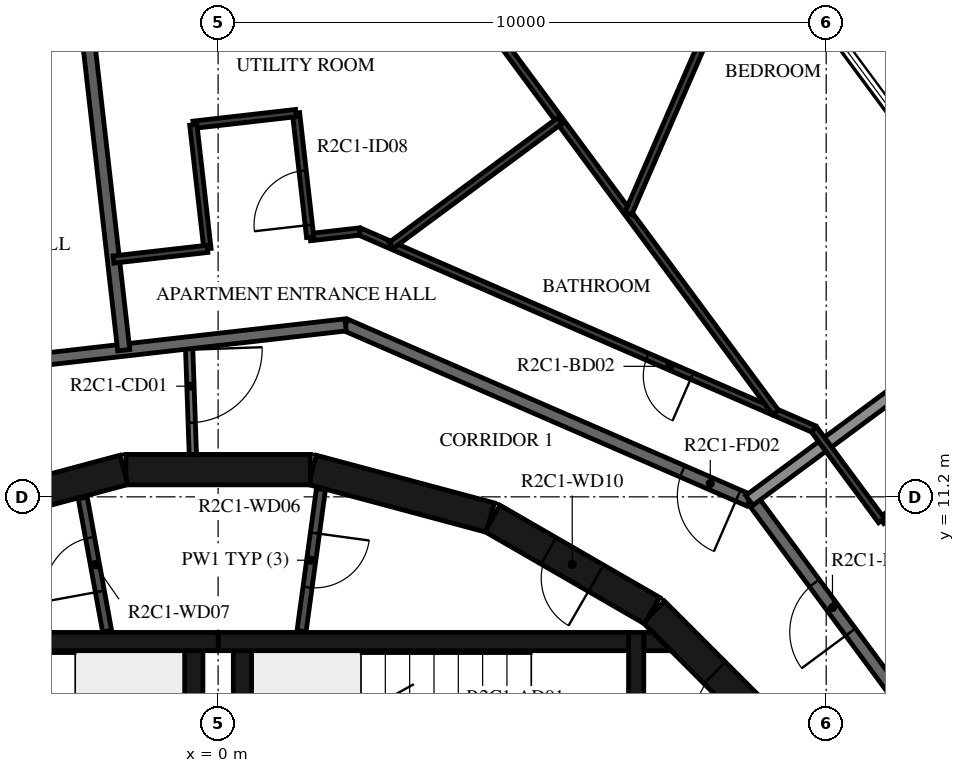
"""IFC4 building model, lengths in metres.
Left out: names, types, materials, properties, quantities, classifications, styles, units other than length and angle.
Written with IfcOpenShell. Run it as: python <this file> out.ifc"""

import sys

from ifc_helpers import new_model, si_unit, direction, frame, frame_2d, origin, place, context, subcontext, project, spatial, polyline, rectangle, outline, extrude, element, fill, save


model = new_model("IFC4")
c1 = context("Model", 3, precision=1e-05, world=origin(), true_north=direction((0.0, 1.0)))
c2 = subcontext(c1, "Body", "Model", "MODEL_VIEW")
j1 = project(units=[si_unit("LENGTHUNIT", "METRE"), si_unit("PLANEANGLEUNIT", "RADIAN")], contexts=[c1])
p1 = place(None, origin())
s1 = spatial("IfcSite", under=j1, at=p1, CompositionType="ELEMENT")
p2 = place(p1, origin())
s2 = spatial("IfcBuilding", under=s1, at=p2, CompositionType="ELEMENT")
p3 = place(p2, frame((0.0, 0.0, 101.2)))
s3 = spatial("IfcBuildingStorey", under=s2, at=p3, CompositionType="ELEMENT", Elevation=101.2)
p4 = place(p3, frame((9.308, 7.164, 0.0), z_axis=(0.0, 0.0, 1.0), x_axis=(-0.707106781187, 0.707106781187, 0.0)))
e1 = element("IfcWall", 1, at=p4, inside=s3, PredefinedType="SHEAR", context=c2, shape_type="SweptSolid", body=[
    extrude(rectangle(XDim=3.032, YDim=0.5, at=frame_2d((1.516, 0.0))), origin(), (0.0, 0.0, 1.0), 3.12),
])
p5 = place(p4, frame((0.416, 0.0, 0.0)))
e2 = element("IfcOpeningElement", 2, at=p5, cuts=e1, PredefinedType="OPENING", context=c2, shape_type="SweptSolid", body=[
    extrude(rectangle(XDim=1.2, YDim=2.1, at=frame_2d((0.6, 1.05))), frame((0.0, 0.26, 0.0), z_axis=(0.0, -1.0, 0.0), x_axis=(1.0, 0.0, 0.0)), (0.0, 0.0, 1.0), 0.52),
])
p6 = place(p3, frame((7.137, 9.329, 0.0), z_axis=(0.0, 0.0, 1.0), x_axis=(-0.865975092491, 0.500087131594, 0.0)))
e3 = element("IfcWall", 3, at=p6, inside=s3, PredefinedType="SHEAR", context=c2, shape_type="SweptSolid", body=[
    extrude(rectangle(XDim=3.033, YDim=0.5, at=frame_2d((1.516, 0.0))), origin(), (0.0, 0.0, 1.0), 3.12),
])
p7 = place(p6, frame((1.066, 0.0, 0.0)))
e4 = element("IfcOpeningElement", 4, at=p7, cuts=e3, PredefinedType="OPENING", context=c2, shape_type="SweptSolid", body=[
    extrude(rectangle(XDim=0.9, YDim=2.1, at=frame_2d((0.45, 1.05))), frame((0.0, 0.26, 0.0), z_axis=(0.0, -1.0, 0.0), x_axis=(1.0, 0.0, 0.0)), (0.0, 0.0, 1.0), 0.52),
])
for number, where, z_axis, x_axis in (
    (5, (4.479, 10.858, 0.0), (0.0, 0.0, 1.0), (-0.966, 0.259, 0.0)),
    (6, (1.516, 11.647, 0.0), (0.0, 0.0, 1.0), (-1.0, 0.0, 0.0)),
    (7, (-1.55, 11.643, 0.0), (0.0, 0.0, 1.0), (-0.966, -0.259, 0.0)),
):
    element("IfcWall", number, at=place(p3, frame(where, z_axis=z_axis, x_axis=x_axis)), inside=s3, PredefinedType="SHEAR", context=c2, shape_type="SweptSolid", body=[
        extrude(rectangle(XDim=3.033, YDim=0.5, at=frame_2d((1.516, 0.0))), origin(), (0.0, 0.0, 1.0), 3.12),
    ])
p8 = place(p3, frame((0.0, 8.82, 0.0), z_axis=(0.0, 0.0, 1.0), x_axis=(1.0, 0.0, 0.0)))
e8 = element("IfcWall", 8, at=p8, inside=s3, PredefinedType="SHEAR", context=c2, shape_type="SweptSolid", body=[
    extrude(rectangle(XDim=6.75, YDim=0.3, at=frame_2d((3.375, 0.0))), origin(), (0.0, 0.0, 1.0), 3.12),
])
p9 = place(p3, frame((0.4, 5.35, 0.0), z_axis=(0.0, 0.0, 1.0), x_axis=(0.0, 1.0, 0.0)))
e9 = element("IfcWall", 9, at=p9, inside=s3, PredefinedType="SHEAR", context=c2, shape_type="SweptSolid", body=[
    extrude(rectangle(XDim=3.32, YDim=0.3, at=frame_2d((1.66, 0.0))), origin(), (0.0, 0.0, 1.0), 3.12),
])
p10 = place(p3, frame((6.875, 5.05, 0.0), z_axis=(0.0, 0.0, 1.0), x_axis=(0.0, 1.0, 0.0)))
e10 = element("IfcWall", 10, at=p10, inside=s3, PredefinedType="SHEAR", context=c2, shape_type="SweptSolid", body=[
    extrude(rectangle(XDim=3.92, YDim=0.25, at=frame_2d((1.96, 0.0))), origin(), (0.0, 0.0, 1.0), 3.12),
])
p11 = place(p10, frame((1.11, 0.0, 0.0)))
e11 = element("IfcOpeningElement", 11, at=p11, cuts=e10, PredefinedType="OPENING", context=c2, shape_type="SweptSolid", body=[
    extrude(rectangle(XDim=1.2, YDim=2.1, at=frame_2d((0.6, 1.05))), frame((0.0, 0.135, 0.0), z_axis=(0.0, -1.0, 0.0), x_axis=(1.0, 0.0, 0.0)), (0.0, 0.0, 1.0), 0.27),
])
p12 = place(p3, origin())
e12 = element("IfcWall", 12, at=p12, inside=s3, PredefinedType="SHEAR", context=c2, shape_type="SweptSolid", body=[
    extrude(outline(polyline([(7.448, 8.67), (7.0, 8.67), (7.0, 8.97), (7.148, 8.97), (7.448, 8.67)])), origin(), (0.0, 0.0, 1.0), 3.12),
])
p13 = place(p3, frame((-6.75, 8.82, 0.0), z_axis=(0.0, 0.0, 1.0), x_axis=(1.0, 0.0, 0.0)))
e13 = element("IfcWall", 13, at=p13, inside=s3, PredefinedType="SHEAR", context=c2, shape_type="SweptSolid", body=[
    extrude(rectangle(XDim=6.75, YDim=0.3, at=frame_2d((3.375, 0.0))), origin(), (0.0, 0.0, 1.0), 3.12),
])
p14 = place(p3, frame((-0.4, 5.35, 0.0), z_axis=(0.0, 0.0, 1.0), x_axis=(0.0, 1.0, 0.0)))
e14 = element("IfcWall", 14, at=p14, inside=s3, PredefinedType="SHEAR", context=c2, shape_type="SweptSolid", body=[
    extrude(rectangle(XDim=3.32, YDim=0.3, at=frame_2d((1.66, 0.0))), origin(), (0.0, 0.0, 1.0), 3.12),
])
p15 = place(p3, frame((1.691, 11.326, 0.0), z_axis=(0.0, 0.0, 1.0), x_axis=(-0.135344253201, -0.990798633994, 0.0)))
e15 = element("IfcWall", 15, at=p15, inside=s3, PredefinedType="PARTITIONING", context=c2, shape_type="SweptSolid", body=[
    extrude(rectangle(XDim=2.358, YDim=0.15, at=frame_2d((1.179, 0.0))), origin(), (0.0, 0.0, 1.0), 3.12),
])
p16 = place(p15, frame((0.729, 0.0, 0.0)))
e16 = element("IfcOpeningElement", 16, at=p16, cuts=e15, PredefinedType="OPENING", context=c2, shape_type="SweptSolid", body=[
    extrude(rectangle(XDim=0.9, YDim=2.1, at=frame_2d((0.45, 1.05))), frame((0.0, 0.085, 0.0), z_axis=(0.0, -1.0, 0.0), x_axis=(1.0, 0.0, 0.0)), (0.0, 0.0, 1.0), 0.17),
])
p17 = place(p3, frame((-1.825, 8.99, 0.0), z_axis=(0.0, 0.0, 1.0), x_axis=(-0.179955206115, 0.983674805915, 0.0)))
e17 = element("IfcWall", 17, at=p17, inside=s3, PredefinedType="PARTITIONING", context=c2, shape_type="SweptSolid", body=[
    extrude(rectangle(XDim=2.229, YDim=0.15, at=frame_2d((1.115, 0.0))), origin(), (0.0, 0.0, 1.0), 3.12),
])
p18 = place(p17, frame((0.665, 0.0, 0.0)))
e18 = element("IfcOpeningElement", 18, at=p18, cuts=e17, PredefinedType="OPENING", context=c2, shape_type="SweptSolid", body=[
    extrude(rectangle(XDim=0.9, YDim=2.1, at=frame_2d((0.45, 1.05))), frame((0.0, 0.085, 0.0), z_axis=(0.0, -1.0, 0.0), x_axis=(1.0, 0.0, 0.0)), (0.0, 0.0, 1.0), 0.17),
])
p19 = place(p3, frame((-0.479, 13.734, 0.0), z_axis=(0.0, 0.0, 1.0), x_axis=(0.034805430832, -0.999394107439, 0.0)))
e19 = element("IfcWall", 19, at=p19, inside=s3, PredefinedType="PARTITIONING", context=c2, shape_type="SweptSolid", body=[
    extrude(rectangle(XDim=1.838, YDim=0.12, at=frame_2d((0.919, 0.0))), origin(), (0.0, 0.0, 1.0), 3.12),
])
p20 = place(p19, frame((0.115, 0.0, 0.0)))
e20 = element("IfcOpeningElement", 20, at=p20, cuts=e19, PredefinedType="OPENING", context=c2, shape_type="SweptSolid", body=[
    extrude(rectangle(XDim=1.2, YDim=2.1, at=frame_2d((0.6, 1.05))), frame((0.0, 0.07, 0.0), z_axis=(0.0, -1.0, 0.0), x_axis=(1.0, 0.0, 0.0)), (0.0, 0.0, 1.0), 0.14),
])
p21 = place(p3, frame((13.196, 5.198, 0.0), z_axis=(0.0, 0.0, 1.0), x_axis=(-0.594805187394, 0.803869883159, 0.0)))
e21 = element("IfcWall", 21, at=p21, inside=s3, PredefinedType="STANDARD", context=c2, shape_type="SweptSolid", body=[
    extrude(rectangle(XDim=7.342, YDim=0.2, at=frame_2d((3.671, 0.0))), origin(), (0.0, 0.0, 1.0), 3.12),
])
p22 = place(p21, frame((4.7, 0.0, 0.0)))
e22 = element("IfcOpeningElement", 22, at=p22, cuts=e21, PredefinedType="OPENING", context=c2, shape_type="SweptSolid", body=[
    extrude(rectangle(XDim=1.0, YDim=2.1, at=frame_2d((0.5, 1.05))), frame((0.0, 0.11, 0.0), z_axis=(0.0, -1.0, 0.0), x_axis=(1.0, 0.0, 0.0)), (0.0, 0.0, 1.0), 0.22),
])
p23 = place(p3, frame((8.736, 11.141, 0.0), z_axis=(0.0, 0.0, 1.0), x_axis=(-0.917051290697, 0.398769269416, 0.0)))
e23 = element("IfcWall", 23, at=p23, inside=s3, PredefinedType="STANDARD", context=c2, shape_type="SweptSolid", body=[
    extrude(rectangle(XDim=7.24, YDim=0.2, at=frame_2d((3.62, 0.0))), origin(), (0.0, 0.0, 1.0), 3.12),
])
p24 = place(p23, frame((0.2, 0.0, 0.0)))
e24 = element("IfcOpeningElement", 24, at=p24, cuts=e23, PredefinedType="OPENING", context=c2, shape_type="SweptSolid", body=[
    extrude(rectangle(XDim=1.0, YDim=2.1, at=frame_2d((0.5, 1.05))), frame((0.0, 0.11, 0.0), z_axis=(0.0, -1.0, 0.0), x_axis=(1.0, 0.0, 0.0)), (0.0, 0.0, 1.0), 0.22),
])
p25 = place(p3, frame((2.096, 14.028, 0.0), z_axis=(0.0, 0.0, 1.0), x_axis=(-0.993569170114, -0.113226782163, 0.0)))
e25 = element("IfcWall", 25, at=p25, inside=s3, PredefinedType="STANDARD", context=c2, shape_type="SweptSolid", body=[
    extrude(rectangle(XDim=7.342, YDim=0.2, at=frame_2d((3.671, 0.0))), origin(), (0.0, 0.0, 1.0), 3.12),
])
p26 = place(p3, frame((13.244, 14.477, 0.0), z_axis=(0.0, 0.0, 1.0), x_axis=(-0.803853971109, -0.594826691677, 0.0)))
e26 = element("IfcWall", 26, at=p26, inside=s3, PredefinedType="STANDARD", context=c2, shape_type="SweptSolid", body=[
    extrude(rectangle(XDim=5.609, YDim=0.2, at=frame_2d((2.804, 0.0))), origin(), (0.0, 0.0, 1.0), 2.73),
])
p27 = place(p3, frame((-2.385, 20.92, 0.0), z_axis=(0.0, 0.0, 1.0), x_axis=(0.113177776247, -0.993574753586, 0.0)))
e27 = element("IfcWall", 27, at=p27, inside=s3, PredefinedType="STANDARD", context=c2, shape_type="SweptSolid", body=[
    extrude(rectangle(XDim=7.356, YDim=0.2, at=frame_2d((3.678, 0.0))), origin(), (0.0, 0.0, 1.0), 3.12),
])
p28 = place(p3, frame((11.831, 11.492, 0.0), z_axis=(0.0, 0.0, 1.0), x_axis=(-0.803843936653, -0.59484025209, 0.0)))
e28 = element("IfcWall", 28, at=p28, inside=s3, PredefinedType="PARTITIONING", context=c2, shape_type="SweptSolid", body=[
    extrude(rectangle(XDim=1.146, YDim=0.12, at=frame_2d((0.573, 0.0))), origin(), (0.0, 0.0, 1.0), 3.12),
])
p29 = place(p3, frame((10.91, 10.81, 0.0), z_axis=(0.0, 0.0, 1.0), x_axis=(-0.59489693125, 0.803801991282, 0.0)))
e29 = element("IfcWall", 29, at=p29, inside=s3, PredefinedType="PARTITIONING", context=c2, shape_type="SweptSolid", body=[
    extrude(rectangle(XDim=1.872, YDim=0.12, at=frame_2d((0.936, 0.0))), origin(), (0.0, 0.0, 1.0), 3.12),
])
p30 = place(p3, frame((9.796, 12.315, 0.0), z_axis=(0.0, 0.0, 1.0), x_axis=(-0.917059572812, 0.398750222463, 0.0)))
e30 = element("IfcWall", 30, at=p30, inside=s3, PredefinedType="PARTITIONING", context=c2, shape_type="SweptSolid", body=[
    extrude(rectangle(XDim=8.146, YDim=0.12, at=frame_2d((4.073, 0.0))), origin(), (0.0, 0.0, 1.0), 3.12),
])
p31 = place(p30, frame((2.185, 0.0, 0.0)))
e31 = element("IfcOpeningElement", 31, at=p31, cuts=e30, PredefinedType="OPENING", context=c2, shape_type="SweptSolid", body=[
    extrude(rectangle(XDim=0.8, YDim=2.1, at=frame_2d((0.4, 1.05))), frame((0.0, 0.07, 0.0), z_axis=(0.0, -1.0, 0.0), x_axis=(1.0, 0.0, 0.0)), (0.0, 0.0, 1.0), 0.14),
])
p32 = place(p3, frame((2.326, 15.563, 0.0), z_axis=(0.0, 0.0, 1.0), x_axis=(-0.993570169982, -0.113218007944, 0.0)))
e32 = element("IfcWall", 32, at=p32, inside=s3, PredefinedType="PARTITIONING", context=c2, shape_type="SweptSolid", body=[
    extrude(rectangle(XDim=0.817, YDim=0.12, at=frame_2d((0.409, 0.0))), origin(), (0.0, 0.0, 1.0), 3.12),
])
p33 = place(p3, frame((1.514, 15.471, 0.0), z_axis=(0.0, 0.0, 1.0), x_axis=(-0.113301814952, 0.993560616535, 0.0)))
e33 = element("IfcWall", 33, at=p33, inside=s3, PredefinedType="PARTITIONING", context=c2, shape_type="SweptSolid", body=[
    extrude(rectangle(XDim=2.053, YDim=0.12, at=frame_2d((1.027, 0.0))), origin(), (0.0, 0.0, 1.0), 3.12),
])
p34 = place(p33, frame((0.2, 0.0, 0.0)))
e34 = element("IfcOpeningElement", 34, at=p34, cuts=e33, PredefinedType="OPENING", context=c2, shape_type="SweptSolid", body=[
    extrude(rectangle(XDim=0.9, YDim=2.1, at=frame_2d((0.45, 1.05))), frame((0.0, 0.07, 0.0), z_axis=(0.0, -1.0, 0.0), x_axis=(1.0, 0.0, 0.0)), (0.0, 0.0, 1.0), 0.14),
])
p35 = place(p3, frame((1.281, 17.511, 0.0), z_axis=(0.0, 0.0, 1.0), x_axis=(-0.993575191649, -0.113173930474, 0.0)))
e35 = element("IfcWall", 35, at=p35, inside=s3, PredefinedType="PARTITIONING", context=c2, shape_type="SweptSolid", body=[
    extrude(rectangle(XDim=1.7, YDim=0.12, at=frame_2d((0.85, 0.0))), origin(), (0.0, 0.0, 1.0), 3.12),
])
p36 = place(p3, frame((-0.408, 17.319, 0.0), z_axis=(0.0, 0.0, 1.0), x_axis=(0.113184449176, -0.993573993452, 0.0)))
e36 = element("IfcWall", 36, at=p36, inside=s3, PredefinedType="PARTITIONING", context=c2, shape_type="SweptSolid", body=[
    extrude(rectangle(XDim=2.053, YDim=0.12, at=frame_2d((1.027, 0.0))), origin(), (0.0, 0.0, 1.0), 3.12),
])
p37 = place(p3, frame((-0.175, 15.278, 0.0), z_axis=(0.0, 0.0, 1.0), x_axis=(-0.993575604955, -0.113170301923, 0.0)))
e37 = element("IfcWall", 37, at=p37, inside=s3, PredefinedType="PARTITIONING", context=c2, shape_type="SweptSolid", body=[
    extrude(rectangle(XDim=1.555, YDim=0.12, at=frame_2d((0.778, 0.0))), origin(), (0.0, 0.0, 1.0), 3.12),
])
p38 = place(p3, frame((0.498, 24.306, 0.0), z_axis=(0.0, 0.0, 1.0), x_axis=(0.594826122019, -0.803854392639, 0.0)))
e38 = element("IfcWall", 38, at=p38, inside=s3, PredefinedType="PARTITIONING", context=c2, shape_type="SweptSolid", body=[
    extrude(rectangle(XDim=14.576, YDim=0.12, at=frame_2d((7.288, 0.0))), origin(), (0.0, 0.0, 1.0), 3.12),
])
p39 = place(p38, frame((2.841, 0.0, 0.0)))
e39 = element("IfcOpeningElement", 39, at=p39, cuts=e38, PredefinedType="OPENING", context=c2, shape_type="SweptSolid", body=[
    extrude(rectangle(XDim=0.9, YDim=2.1, at=frame_2d((0.45, 1.05))), frame((0.0, 0.07, 0.0), z_axis=(0.0, -1.0, 0.0), x_axis=(1.0, 0.0, 0.0)), (0.0, 0.0, 1.0), 0.14),
])
p40 = place(p38, frame((0.605, 0.0, 0.0)))
e40 = element("IfcOpeningElement", 40, at=p40, cuts=e38, PredefinedType="OPENING", context=c2, shape_type="SweptSolid", body=[
    extrude(rectangle(XDim=0.9, YDim=2.1, at=frame_2d((0.45, 1.05))), frame((0.0, 0.07, 0.0), z_axis=(0.0, -1.0, 0.0), x_axis=(1.0, 0.0, 0.0)), (0.0, 0.0, 1.0), 0.14),
])
p41 = place(p3, frame((8.772, 20.521, 0.0), z_axis=(0.0, 0.0, 1.0), x_axis=(-0.398733139635, -0.917067000473, 0.0)))
e41 = element("IfcWall", 41, at=p41, inside=s3, PredefinedType="PARTITIONING", context=c2, shape_type="SweptSolid", body=[
    extrude(rectangle(XDim=5.081, YDim=0.12, at=frame_2d((2.541, 0.0))), origin(), (0.0, 0.0, 1.0), 3.12),
])
p42 = place(p41, frame((0.4, 0.0, 0.0)))
e42 = element("IfcOpeningElement", 42, at=p42, cuts=e41, PredefinedType="OPENING", context=c2, shape_type="SweptSolid", body=[
    extrude(rectangle(XDim=0.9, YDim=2.1, at=frame_2d((0.45, 1.05))), frame((0.0, 0.07, 0.0), z_axis=(0.0, -1.0, 0.0), x_axis=(1.0, 0.0, 0.0)), (0.0, 0.0, 1.0), 0.14),
])
p43 = place(p3, frame((5.618, 17.386, 0.0), z_axis=(0.0, 0.0, 1.0), x_axis=(-0.803852063114, -0.59482927015, 0.0)))
e43 = element("IfcWall", 43, at=p43, inside=s3, PredefinedType="PARTITIONING", context=c2, shape_type="SweptSolid", body=[
    extrude(rectangle(XDim=3.446, YDim=0.12, at=frame_2d((1.723, 0.0))), origin(), (0.0, 0.0, 1.0), 3.12),
])
p44 = place(p5, origin())
e44 = element("IfcDoor", 44, at=p44, inside=s3, OperationType="SINGLE_SWING_RIGHT", PredefinedType="DOOR", context=c2, shape_type="SweptSolid", body=[
    extrude(rectangle(XDim=1.2, YDim=2.1, at=frame_2d((0.6, 1.05))), frame((0.0, 0.025, 0.0), z_axis=(0.0, -1.0, 0.0), x_axis=(1.0, 0.0, 0.0)), (0.0, 0.0, 1.0), 0.05),
])
fill(e2, e44)
p45 = place(p16, origin())
e45 = element("IfcDoor", 45, at=p45, inside=s3, OperationType="SINGLE_SWING_LEFT", PredefinedType="DOOR", context=c2, shape_type="SweptSolid", body=[
    extrude(rectangle(XDim=0.9, YDim=2.1, at=frame_2d((0.45, 1.05))), frame((0.0, 0.025, 0.0), z_axis=(0.0, -1.0, 0.0), x_axis=(1.0, 0.0, 0.0)), (0.0, 0.0, 1.0), 0.05),
])
fill(e16, e45)
p46 = place(p18, origin())
e46 = element("IfcDoor", 46, at=p46, inside=s3, OperationType="SINGLE_SWING_RIGHT", PredefinedType="DOOR", context=c2, shape_type="SweptSolid", body=[
    extrude(rectangle(XDim=0.9, YDim=2.1, at=frame_2d((0.45, 1.05))), frame((0.0, 0.025, 0.0), z_axis=(0.0, -1.0, 0.0), x_axis=(1.0, 0.0, 0.0)), (0.0, 0.0, 1.0), 0.05),
])
fill(e18, e46)
p47 = place(p7, origin())
e47 = element("IfcDoor", 47, at=p47, inside=s3, OperationType="SINGLE_SWING_LEFT", PredefinedType="DOOR", context=c2, shape_type="SweptSolid", body=[
    extrude(rectangle(XDim=0.9, YDim=2.1, at=frame_2d((0.45, 1.05))), frame((0.0, 0.025, 0.0), z_axis=(0.0, -1.0, 0.0), x_axis=(1.0, 0.0, 0.0)), (0.0, 0.0, 1.0), 0.05),
])
fill(e4, e47)
p48 = place(p22, origin())
e48 = element("IfcDoor", 48, at=p48, inside=s3, OperationType="SINGLE_SWING_RIGHT", PredefinedType="DOOR", context=c2, shape_type="SweptSolid", body=[
    extrude(rectangle(XDim=1.0, YDim=2.1, at=frame_2d((0.5, 1.05))), frame((0.0, 0.025, 0.0), z_axis=(0.0, -1.0, 0.0), x_axis=(1.0, 0.0, 0.0)), (0.0, 0.0, 1.0), 0.05),
])
fill(e22, e48)
p49 = place(p24, origin())
e49 = element("IfcDoor", 49, at=p49, inside=s3, OperationType="SINGLE_SWING_RIGHT", PredefinedType="DOOR", context=c2, shape_type="SweptSolid", body=[
    extrude(rectangle(XDim=1.0, YDim=2.1, at=frame_2d((0.5, 1.05))), frame((0.0, 0.025, 0.0), z_axis=(0.0, -1.0, 0.0), x_axis=(1.0, 0.0, 0.0)), (0.0, 0.0, 1.0), 0.05),
])
fill(e24, e49)
p50 = place(p31, origin())
e50 = element("IfcDoor", 50, at=p50, inside=s3, OperationType="SINGLE_SWING_RIGHT", PredefinedType="DOOR", context=c2, shape_type="SweptSolid", body=[
    extrude(rectangle(XDim=0.8, YDim=2.1, at=frame_2d((0.4, 1.05))), frame((0.0, 0.025, 0.0), z_axis=(0.0, -1.0, 0.0), x_axis=(1.0, 0.0, 0.0)), (0.0, 0.0, 1.0), 0.05),
])
fill(e31, e50)
p51 = place(p34, origin())
e51 = element("IfcDoor", 51, at=p51, inside=s3, OperationType="SINGLE_SWING_RIGHT", PredefinedType="DOOR", context=c2, shape_type="SweptSolid", body=[
    extrude(rectangle(XDim=0.9, YDim=2.1, at=frame_2d((0.45, 1.05))), frame((0.0, 0.025, 0.0), z_axis=(0.0, -1.0, 0.0), x_axis=(1.0, 0.0, 0.0)), (0.0, 0.0, 1.0), 0.05),
])
fill(e34, e51)
p52 = place(p20, origin())
e52 = element("IfcDoor", 52, at=p52, inside=s3, OperationType="DOUBLE_DOOR_SINGLE_SWING", PredefinedType="DOOR", context=c2, shape_type="SweptSolid", body=[
    extrude(rectangle(XDim=1.2, YDim=2.1, at=frame_2d((0.6, 1.05))), frame((0.0, 0.025, 0.0), z_axis=(0.0, -1.0, 0.0), x_axis=(1.0, 0.0, 0.0)), (0.0, 0.0, 1.0), 0.05),
])
fill(e20, e52)
save(model, sys.argv[1])
